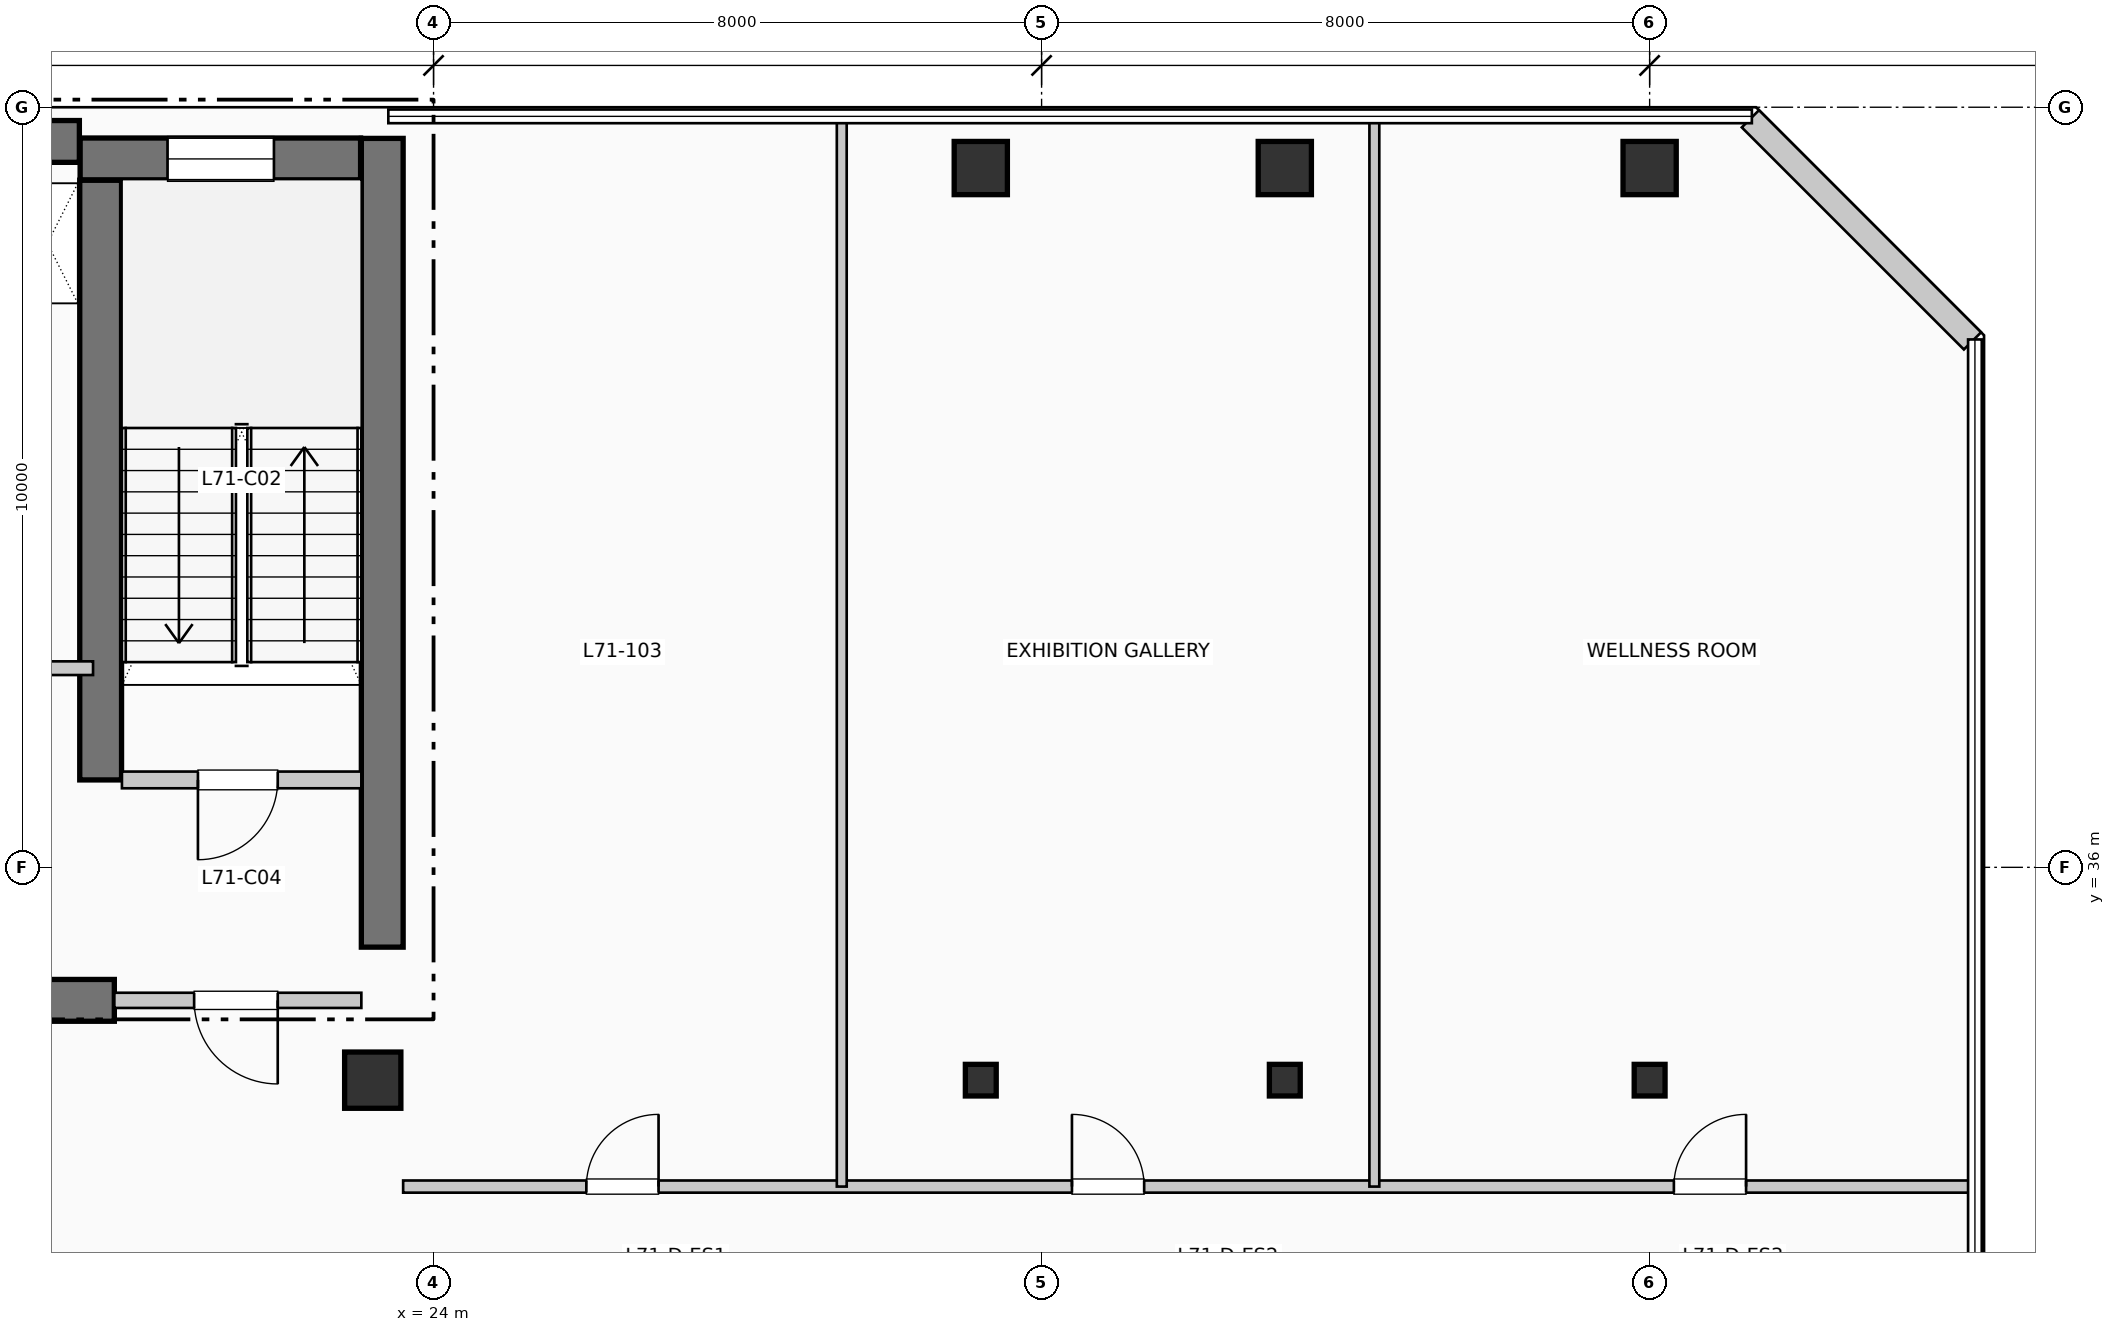
"""IFC4 building model, lengths in metres.
Left out: names, types, materials, properties, quantities, classifications, styles, units other than length and angle.
Written with IfcOpenShell. Run it as: python <this file> out.ifc"""

import sys

from ifc_helpers import new_model, si_unit, direction, frame, frame_2d, origin, origin_2d, place, context, subcontext, project, spatial, rectangle, i_section, extrude, element, fill, save


model = new_model("IFC4")
c1 = context("Model", 3, precision=1e-05, world=origin(), true_north=direction((0.0, 1.0)))
c2 = subcontext(c1, "Body", "Model", "MODEL_VIEW")
j1 = project(units=[si_unit("LENGTHUNIT", "METRE"), si_unit("PLANEANGLEUNIT", "RADIAN")], contexts=[c1])
p1 = place(None, origin())
s1 = spatial("IfcSite", under=j1, at=p1, CompositionType="ELEMENT")
p2 = place(p1, origin())
s2 = spatial("IfcBuilding", under=s1, at=p2, CompositionType="ELEMENT")
p3 = place(p2, frame((0.0, 0.0, 292.05)))
s3 = spatial("IfcBuildingStorey", under=s2, at=p3, CompositionType="ELEMENT", Elevation=292.05)
p4 = place(p3, frame((5.36, 45.55, 0.0), z_axis=(0.0, 0.0, 1.0), x_axis=(1.0, 0.0, 0.0)))
e1 = element("IfcWall", 1, at=p4, inside=s3, PredefinedType="SHEAR", context=c2, shape_type="SweptSolid", body=[
    extrude(rectangle(XDim=13.98, YDim=0.55, at=frame_2d((6.99, 0.0))), origin(), (0.0, 0.0, 1.0), 3.96),
])
p5 = place(p3, frame((23.325, 34.95, 0.0), z_axis=(0.0, 0.0, 1.0), x_axis=(0.0, 1.0, 0.0)))
e2 = element("IfcWall", 2, at=p5, inside=s3, PredefinedType="SHEAR", context=c2, shape_type="SweptSolid", body=[
    extrude(rectangle(XDim=10.64, YDim=0.55, at=frame_2d((5.32, 0.0))), origin(), (0.0, 0.0, 1.0), 3.96),
])
p6 = place(p3, frame((13.68, 34.25, 0.0), z_axis=(0.0, 0.0, 1.0), x_axis=(1.0, 0.0, 0.0)))
e3 = element("IfcWall", 3, at=p6, inside=s3, PredefinedType="SHEAR", context=c2, shape_type="SweptSolid", body=[
    extrude(rectangle(XDim=6.12, YDim=0.55, at=frame_2d((3.06, 0.0))), origin(), (0.0, 0.0, 1.0), 3.96),
])
p7 = place(p3, frame((19.62, 37.15, 0.0), z_axis=(0.0, 0.0, 1.0), x_axis=(0.0, 1.0, 0.0)))
e4 = element("IfcWall", 4, at=p7, inside=s3, PredefinedType="SHEAR", context=c2, shape_type="SweptSolid", body=[
    extrude(rectangle(XDim=7.89, YDim=0.55, at=frame_2d((3.945, 0.0))), origin(), (0.0, 0.0, 1.0), 3.96),
])
p8 = place(p3, frame((19.35, 45.32, 0.0), z_axis=(0.0, 0.0, 1.0), x_axis=(1.0, 0.0, 0.0)))
e5 = element("IfcWall", 5, at=p8, inside=s3, PredefinedType="SHEAR", context=c2, shape_type="SweptSolid", body=[
    extrude(rectangle(XDim=3.69, YDim=0.55, at=frame_2d((1.845, 0.0))), origin(), (0.0, 0.0, 1.0), 3.96),
])
p9 = place(p8, frame((1.15, 0.0, 1.05)))
e6 = element("IfcOpeningElement", 6, at=p9, cuts=e5, PredefinedType="OPENING", context=c2, shape_type="SweptSolid", body=[
    extrude(rectangle(XDim=1.4, YDim=1.8, at=frame_2d((0.7, 0.9))), frame((0.0, 0.285, 0.0), z_axis=(0.0, -1.0, 0.0), x_axis=(1.0, 0.0, 0.0)), (0.0, 0.0, 1.0), 0.57),
])
p10 = place(p3, frame((23.2, 33.2, 0.0), z_axis=(0.0, 0.0, 1.0), x_axis=(1.0, 0.0, 0.0)))
e7 = element("IfcColumn", 7, at=p10, inside=s3, PredefinedType="COLUMN", context=c2, shape_type="SweptSolid", body=[
    extrude(rectangle(XDim=0.74, YDim=0.74, at=origin_2d()), origin(), (0.0, 0.0, 1.0), 3.96),
])
p11 = place(p3, frame((31.2, 33.2, 0.0), z_axis=(0.0, 0.0, 1.0), x_axis=(1.0, 0.0, 0.0)))
e8 = element("IfcColumn", 8, at=p11, inside=s3, PredefinedType="COLUMN", context=c2, shape_type="SweptSolid", body=[
    extrude(i_section(OverallWidth=0.406, OverallDepth=0.416, WebThickness=0.022, FlangeThickness=0.036, at=origin_2d()), origin(), (0.0, 0.0, 1.0), 3.96),
])
p12 = place(p3, frame((31.2, 45.2, 0.0), z_axis=(0.0, 0.0, 1.0), x_axis=(1.0, 0.0, 0.0)))
e9 = element("IfcColumn", 9, at=p12, inside=s3, PredefinedType="COLUMN", context=c2, shape_type="SweptSolid", body=[
    extrude(rectangle(XDim=0.7, YDim=0.7, at=origin_2d()), origin(), (0.0, 0.0, 1.0), 3.96),
])
p13 = place(p3, frame((35.2, 33.2, 0.0), z_axis=(0.0, 0.0, 1.0), x_axis=(1.0, 0.0, 0.0)))
e10 = element("IfcColumn", 10, at=p13, inside=s3, PredefinedType="COLUMN", context=c2, shape_type="SweptSolid", body=[
    extrude(i_section(OverallWidth=0.406, OverallDepth=0.416, WebThickness=0.022, FlangeThickness=0.036, at=origin_2d()), origin(), (0.0, 0.0, 1.0), 3.96),
])
p14 = place(p3, frame((35.2, 45.2, 0.0), z_axis=(0.0, 0.0, 1.0), x_axis=(1.0, 0.0, 0.0)))
e11 = element("IfcColumn", 11, at=p14, inside=s3, PredefinedType="COLUMN", context=c2, shape_type="SweptSolid", body=[
    extrude(rectangle(XDim=0.7, YDim=0.7, at=origin_2d()), origin(), (0.0, 0.0, 1.0), 3.96),
])
p15 = place(p3, frame((40.0, 33.2, 0.0), z_axis=(0.0, 0.0, 1.0), x_axis=(1.0, 0.0, 0.0)))
e12 = element("IfcColumn", 12, at=p15, inside=s3, PredefinedType="COLUMN", context=c2, shape_type="SweptSolid", body=[
    extrude(i_section(OverallWidth=0.406, OverallDepth=0.416, WebThickness=0.022, FlangeThickness=0.036, at=origin_2d()), origin(), (0.0, 0.0, 1.0), 3.96),
])
p16 = place(p3, frame((40.0, 45.2, 0.0), z_axis=(0.0, 0.0, 1.0), x_axis=(1.0, 0.0, 0.0)))
e13 = element("IfcColumn", 13, at=p16, inside=s3, PredefinedType="COLUMN", context=c2, shape_type="SweptSolid", body=[
    extrude(rectangle(XDim=0.7, YDim=0.7, at=origin_2d()), origin(), (0.0, 0.0, 1.0), 3.96),
])
p17 = place(p3, frame((44.248, 42.926, 0.0), z_axis=(0.0, 0.0, 1.0), x_axis=(-0.707136318428, 0.707077242712, 0.0)))
e14 = element("IfcWall", 14, at=p17, inside=s3, PredefinedType="SOLIDWALL", context=c2, shape_type="SweptSolid", body=[
    extrude(rectangle(XDim=4.133, YDim=0.32, at=frame_2d((2.066, 0.0))), origin(), (0.0, 0.0, 1.0), 3.74),
])
p18 = place(p3, frame((19.9, 37.15, 0.0), z_axis=(0.0, 0.0, 1.0), x_axis=(1.0, 0.0, 0.0)))
e15 = element("IfcWall", 15, at=p18, inside=s3, PredefinedType="PARTITIONING", context=c2, shape_type="SweptSolid", body=[
    extrude(rectangle(XDim=3.15, YDim=0.22, at=frame_2d((1.575, 0.0))), origin(), (0.0, 0.0, 1.0), 3.74),
])
p19 = place(p18, frame((2.05, 0.0, 0.0), z_axis=(0.0, 0.0, 1.0), x_axis=(-1.0, 0.0, 0.0)))
e16 = element("IfcOpeningElement", 16, at=p19, cuts=e15, PredefinedType="OPENING", context=c2, shape_type="SweptSolid", body=[
    extrude(rectangle(XDim=1.05, YDim=2.15, at=frame_2d((0.525, 1.075))), frame((0.0, 0.12, 0.0), z_axis=(0.0, -1.0, 0.0), x_axis=(1.0, 0.0, 0.0)), (0.0, 0.0, 1.0), 0.24),
])
p20 = place(p3, frame((19.8, 34.25, 0.0), z_axis=(0.0, 0.0, 1.0), x_axis=(1.0, 0.0, 0.0)))
e17 = element("IfcWall", 17, at=p20, inside=s3, PredefinedType="PARTITIONING", context=c2, shape_type="SweptSolid", body=[
    extrude(rectangle(XDim=3.25, YDim=0.2, at=frame_2d((1.625, 0.0))), origin(), (0.0, 0.0, 1.0), 3.74),
])
p21 = place(p20, frame((2.15, 0.0, 0.0), z_axis=(0.0, 0.0, 1.0), x_axis=(-1.0, 0.0, 0.0)))
e18 = element("IfcOpeningElement", 18, at=p21, cuts=e17, PredefinedType="OPENING", context=c2, shape_type="SweptSolid", body=[
    extrude(rectangle(XDim=1.1, YDim=2.15, at=frame_2d((0.55, 1.075))), frame((0.0, 0.11, 0.0), z_axis=(0.0, -1.0, 0.0), x_axis=(1.0, 0.0, 0.0)), (0.0, 0.0, 1.0), 0.22),
])
p22 = place(p3, frame((17.68, 38.62, 0.0), z_axis=(0.0, 0.0, 1.0), x_axis=(1.0, 0.0, 0.0)))
e19 = element("IfcWall", 19, at=p22, inside=s3, PredefinedType="PARTITIONING", context=c2, shape_type="SweptSolid", body=[
    extrude(rectangle(XDim=1.84, YDim=0.18, at=frame_2d((0.92, 0.0))), origin(), (0.0, 0.0, 1.0), 3.74),
])
p23 = place(p22, frame((0.24, 0.0, 0.0)))
e20 = element("IfcOpeningElement", 20, at=p23, cuts=e19, PredefinedType="OPENING", context=c2, shape_type="SweptSolid", body=[
    extrude(rectangle(XDim=0.92, YDim=2.1, at=frame_2d((0.46, 1.05))), frame((0.0, 0.1, 0.0), z_axis=(0.0, -1.0, 0.0), x_axis=(1.0, 0.0, 0.0)), (0.0, 0.0, 1.0), 0.2),
])
p24 = place(p3, frame((23.6, 31.8, 0.0), z_axis=(0.0, 0.0, 1.0), x_axis=(1.0, 0.0, 0.0)))
e21 = element("IfcWall", 21, at=p24, inside=s3, PredefinedType="PARTITIONING", context=c2, shape_type="SweptSolid", body=[
    extrude(rectangle(XDim=20.61, YDim=0.16, at=frame_2d((10.305, 0.0))), origin(), (0.0, 0.0, 1.0), 3.74),
])
p25 = place(p24, frame((2.41, 0.0, 0.0)))
e22 = element("IfcOpeningElement", 22, at=p25, cuts=e21, PredefinedType="OPENING", context=c2, shape_type="SweptSolid", body=[
    extrude(rectangle(XDim=0.95, YDim=2.15, at=frame_2d((0.475, 1.075))), frame((0.0, 0.09, 0.0), z_axis=(0.0, -1.0, 0.0), x_axis=(1.0, 0.0, 0.0)), (0.0, 0.0, 1.0), 0.18),
])
p26 = place(p24, frame((8.8, 0.0, 0.0)))
e23 = element("IfcOpeningElement", 23, at=p26, cuts=e21, PredefinedType="OPENING", context=c2, shape_type="SweptSolid", body=[
    extrude(rectangle(XDim=0.95, YDim=2.15, at=frame_2d((0.475, 1.075))), frame((0.0, 0.09, 0.0), z_axis=(0.0, -1.0, 0.0), x_axis=(1.0, 0.0, 0.0)), (0.0, 0.0, 1.0), 0.18),
])
p27 = place(p24, frame((16.719, 0.0, 0.0)))
e24 = element("IfcOpeningElement", 24, at=p27, cuts=e21, PredefinedType="OPENING", context=c2, shape_type="SweptSolid", body=[
    extrude(rectangle(XDim=0.95, YDim=2.15, at=frame_2d((0.475, 1.075))), frame((0.0, 0.09, 0.0), z_axis=(0.0, -1.0, 0.0), x_axis=(1.0, 0.0, 0.0)), (0.0, 0.0, 1.0), 0.18),
])
for number, where, z_axis, x_axis in (
    (25, (29.371, 31.8, 0.0), (0.0, 0.0, 1.0), (0.0, 1.0, 0.0)),
    (26, (36.378, 31.8, 0.0), (0.0, 0.0, 1.0), (0.0, 1.0, 0.0)),
):
    element("IfcWall", number, at=place(p3, frame(where, z_axis=z_axis, x_axis=x_axis)), inside=s3, PredefinedType="PARTITIONING", context=c2, shape_type="SweptSolid", body=[
        extrude(rectangle(XDim=14.01, YDim=0.13, at=frame_2d((7.005, 0.0))), origin(), (0.0, 0.0, 1.0), 3.74),
    ])
p28 = place(p9, origin())
e27 = element("IfcWindow", 27, at=p28, inside=s3, PartitioningType="SINGLE_PANEL", PredefinedType="WINDOW", context=c2, shape_type="SweptSolid", body=[
    extrude(rectangle(XDim=1.4, YDim=1.8, at=frame_2d((0.7, 0.9))), frame((0.0, 0.03, 0.0), z_axis=(0.0, -1.0, 0.0), x_axis=(1.0, 0.0, 0.0)), (0.0, 0.0, 1.0), 0.06),
])
fill(e6, e27)
p29 = place(p19, origin())
e28 = element("IfcDoor", 28, at=p29, inside=s3, OperationType="SINGLE_SWING_LEFT", PredefinedType="DOOR", context=c2, shape_type="SweptSolid", body=[
    extrude(rectangle(XDim=1.05, YDim=2.15, at=frame_2d((0.525, 1.075))), frame((0.0, 0.025, 0.0), z_axis=(0.0, -1.0, 0.0), x_axis=(1.0, 0.0, 0.0)), (0.0, 0.0, 1.0), 0.05),
])
fill(e16, e28)
p30 = place(p21, origin())
e29 = element("IfcDoor", 29, at=p30, inside=s3, OperationType="SINGLE_SWING_RIGHT", PredefinedType="DOOR", context=c2, shape_type="SweptSolid", body=[
    extrude(rectangle(XDim=1.1, YDim=2.15, at=frame_2d((0.55, 1.075))), frame((0.0, 0.025, 0.0), z_axis=(0.0, -1.0, 0.0), x_axis=(1.0, 0.0, 0.0)), (0.0, 0.0, 1.0), 0.05),
])
fill(e18, e29)
p31 = place(p25, origin())
e30 = element("IfcDoor", 30, at=p31, inside=s3, OperationType="SINGLE_SWING_RIGHT", PredefinedType="DOOR", context=c2, shape_type="SweptSolid", body=[
    extrude(rectangle(XDim=0.95, YDim=2.15, at=frame_2d((0.475, 1.075))), frame((0.0, 0.025, 0.0), z_axis=(0.0, -1.0, 0.0), x_axis=(1.0, 0.0, 0.0)), (0.0, 0.0, 1.0), 0.05),
])
fill(e22, e30)
p32 = place(p26, origin())
e31 = element("IfcDoor", 31, at=p32, inside=s3, OperationType="SINGLE_SWING_LEFT", PredefinedType="DOOR", context=c2, shape_type="SweptSolid", body=[
    extrude(rectangle(XDim=0.95, YDim=2.15, at=frame_2d((0.475, 1.075))), frame((0.0, 0.025, 0.0), z_axis=(0.0, -1.0, 0.0), x_axis=(1.0, 0.0, 0.0)), (0.0, 0.0, 1.0), 0.05),
])
fill(e23, e31)
p33 = place(p27, origin())
e32 = element("IfcDoor", 32, at=p33, inside=s3, OperationType="SINGLE_SWING_RIGHT", PredefinedType="DOOR", context=c2, shape_type="SweptSolid", body=[
    extrude(rectangle(XDim=0.95, YDim=2.15, at=frame_2d((0.475, 1.075))), frame((0.0, 0.025, 0.0), z_axis=(0.0, -1.0, 0.0), x_axis=(1.0, 0.0, 0.0)), (0.0, 0.0, 1.0), 0.05),
])
fill(e24, e32)
save(model, sys.argv[1])
